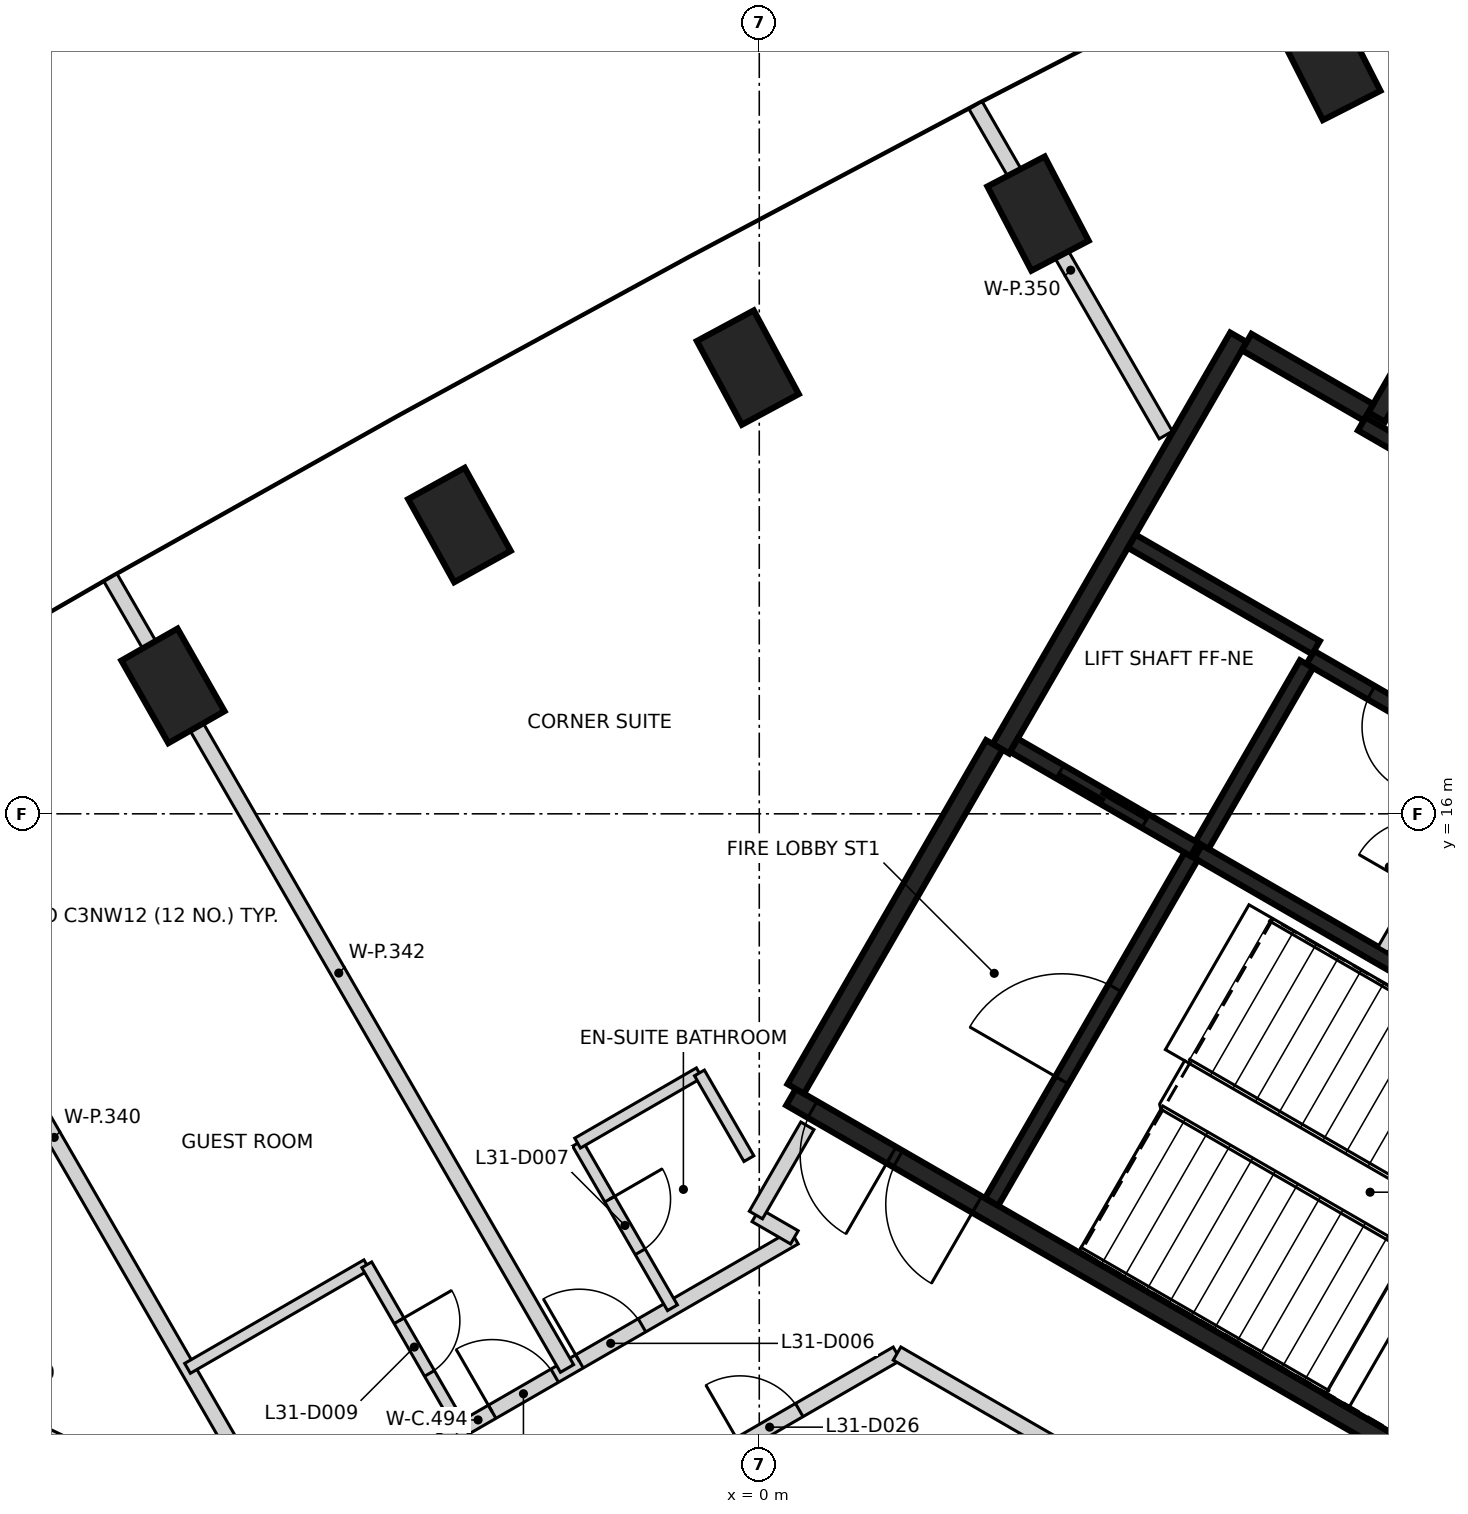
"""IFC4 building model, lengths in metres.
Left out: names, types, materials, properties, quantities, classifications, styles, units other than length and angle.
Written with IfcOpenShell. Run it as: python <this file> out.ifc"""

import sys

from ifc_helpers import new_model, si_unit, direction, frame, frame_2d, origin, origin_2d, place, context, subcontext, project, spatial, rectangle, extrude, element, fill, save


model = new_model("IFC4")
c1 = context("Model", 3, precision=1e-05, world=origin(), true_north=direction((0.0, 1.0)))
c2 = subcontext(c1, "Body", "Model", "MODEL_VIEW")
j1 = project(units=[si_unit("LENGTHUNIT", "METRE"), si_unit("PLANEANGLEUNIT", "RADIAN")], contexts=[c1])
p1 = place(None, origin())
s1 = spatial("IfcSite", under=j1, at=p1, CompositionType="ELEMENT")
p2 = place(p1, origin())
s2 = spatial("IfcBuilding", under=s1, at=p2, CompositionType="ELEMENT")
p3 = place(p2, frame((0.0, 0.0, 128.8)))
s3 = spatial("IfcBuildingStorey", under=s2, at=p3, CompositionType="ELEMENT", Elevation=128.8)
for number, where, z_axis, x_axis in (
    (1, (7.51, 25.876, -0.4), (0.0, 0.0, 1.0), (-0.453, 0.892, 0.0)),
    (2, (3.667, 23.896, -0.4), (0.0, 0.0, 1.0), (-0.463, 0.886, 0.0)),
    (3, (-0.151, 21.871, -0.4), (0.0, 0.0, 1.0), (-0.474, 0.881, 0.0)),
    (4, (-3.945, 19.8, -0.4), (0.0, 0.0, 1.0), (-0.485, 0.875, 0.0)),
    (5, (-7.714, 17.683, -0.4), (0.0, 0.0, 1.0), (-0.495, 0.869, 0.0)),
):
    element("IfcColumn", number, at=place(p3, frame(where, z_axis=z_axis, x_axis=x_axis)), inside=s3, PredefinedType="COLUMN", context=c2, shape_type="SweptSolid", body=[
        extrude(rectangle(XDim=1.25, YDim=0.85, at=origin_2d()), origin(), (0.0, 0.0, 1.0), 3.6),
    ])
p4 = place(p3, frame((10.42, 6.498, 0.0), z_axis=(0.0, 0.0, 1.0), x_axis=(-0.866021906294, 0.500006057782, 0.0)))
e6 = element("IfcWall", 6, at=p4, inside=s3, PredefinedType="SHEAR", context=c2, shape_type="SweptSolid", body=[
    extrude(rectangle(XDim=11.55, YDim=0.25, at=frame_2d((5.775, 0.0))), origin(), (0.0, 0.0, 1.0), 3.2),
])
p5 = place(p4, frame((10.025, 0.0, 0.0)))
e7 = element("IfcOpeningElement", 7, at=p5, cuts=e6, PredefinedType="OPENING", context=c2, shape_type="SweptSolid", body=[
    extrude(rectangle(XDim=1.2, YDim=2.1, at=frame_2d((0.6, 1.05))), frame((0.0, 0.135, 0.0), z_axis=(0.0, -1.0, 0.0), x_axis=(1.0, 0.0, 0.0)), (0.0, 0.0, 1.0), 0.27),
])
p6 = place(p4, frame((8.725, 0.0, 0.0)))
e8 = element("IfcOpeningElement", 8, at=p6, cuts=e6, PredefinedType="OPENING", context=c2, shape_type="SweptSolid", body=[
    extrude(rectangle(XDim=1.2, YDim=2.1, at=frame_2d((0.6, 1.05))), frame((0.0, 0.135, 0.0), z_axis=(0.0, -1.0, 0.0), x_axis=(1.0, 0.0, 0.0)), (0.0, 0.0, 1.0), 0.27),
])
p7 = place(p3, frame((3.179, 16.856, 0.0), z_axis=(0.0, 0.0, 1.0), x_axis=(0.500004234368, 0.866022959057, 0.0)))
e9 = element("IfcWall", 9, at=p7, inside=s3, PredefinedType="SHEAR", context=c2, shape_type="SweptSolid", body=[
    extrude(rectangle(XDim=6.25, YDim=0.25, at=frame_2d((3.125, 0.0))), origin(), (0.0, 0.0, 1.0), 3.2),
])
p8 = place(p3, frame((0.48, 12.381, 0.0), z_axis=(0.0, 0.0, 1.0), x_axis=(0.49999885962, 0.866026062182, 0.0)))
e10 = element("IfcWall", 10, at=p8, inside=s3, PredefinedType="SHEAR", context=c2, shape_type="SweptSolid", body=[
    extrude(rectangle(XDim=5.225, YDim=0.25, at=frame_2d((2.612, 0.0))), origin(), (0.0, 0.0, 1.0), 3.2),
])
p9 = place(p3, frame((8.123, 21.219, 0.0), z_axis=(0.0, 0.0, 1.0), x_axis=(0.499987686533, 0.866032512851, 0.0)))
e11 = element("IfcWall", 11, at=p9, inside=s3, PredefinedType="SHEAR", context=c2, shape_type="SweptSolid", body=[
    extrude(rectangle(XDim=2.975, YDim=0.25, at=frame_2d((1.487, 0.0))), origin(), (0.0, 0.0, 1.0), 3.2),
])
p10 = place(p3, frame((6.413, 22.206, 0.0), z_axis=(0.0, 0.0, 1.0), x_axis=(0.866016279763, -0.500015802937, 0.0)))
e12 = element("IfcWall", 12, at=p10, inside=s3, PredefinedType="SHEAR", context=c2, shape_type="SweptSolid", body=[
    extrude(rectangle(XDim=1.849, YDim=0.25, at=frame_2d((0.925, 0.0))), origin(), (0.0, 0.0, 1.0), 3.2),
])
p11 = place(p3, frame((13.21, 18.08, 0.0), z_axis=(0.0, 0.0, 1.0), x_axis=(-0.866030299012, 0.499991521122, 0.0)))
e13 = element("IfcWall", 13, at=p11, inside=s3, PredefinedType="SHEAR", context=c2, shape_type="SweptSolid", body=[
    extrude(rectangle(XDim=6.1, YDim=0.2, at=frame_2d((3.05, 0.0))), origin(), (0.0, 0.0, 1.0), 3.2),
])
p12 = place(p11, frame((1.0, 0.0, 0.0)))
e14 = element("IfcOpeningElement", 14, at=p12, cuts=e13, PredefinedType="OPENING", context=c2, shape_type="SweptSolid", body=[
    extrude(rectangle(XDim=1.2, YDim=2.1, at=frame_2d((0.6, 1.05))), frame((0.0, 0.11, 0.0), z_axis=(0.0, -1.0, 0.0), x_axis=(1.0, 0.0, 0.0)), (0.0, 0.0, 1.0), 0.22),
])
p13 = place(p11, frame((4.05, 0.0, 0.0)))
e15 = element("IfcOpeningElement", 15, at=p13, cuts=e13, PredefinedType="OPENING", context=c2, shape_type="SweptSolid", body=[
    extrude(rectangle(XDim=1.2, YDim=2.1, at=frame_2d((0.6, 1.05))), frame((0.0, 0.11, 0.0), z_axis=(0.0, -1.0, 0.0), x_axis=(1.0, 0.0, 0.0)), (0.0, 0.0, 1.0), 0.22),
])
p14 = place(p3, frame((5.775, 15.502, 0.0), z_axis=(0.0, 0.0, 1.0), x_axis=(0.866020080793, -0.500009219579, 0.0)))
e16 = element("IfcWall", 16, at=p14, inside=s3, PredefinedType="SHEAR", context=c2, shape_type="SweptSolid", body=[
    extrude(rectangle(XDim=5.699, YDim=0.2, at=frame_2d((2.85, 0.0))), origin(), (0.0, 0.0, 1.0), 3.2),
])
p15 = place(p3, frame((12.185, 15.207, 0.0), z_axis=(0.0, 0.0, 1.0), x_axis=(-0.866020080793, 0.500009219579, 0.0)))
e17 = element("IfcWall", 17, at=p15, inside=s3, PredefinedType="SHEAR", context=c2, shape_type="SweptSolid", body=[
    extrude(rectangle(XDim=5.699, YDim=0.2, at=frame_2d((2.85, 0.0))), origin(), (0.0, 0.0, 1.0), 3.2),
])
p16 = place(p15, frame((3.874, 0.0, 0.0)))
e18 = element("IfcOpeningElement", 18, at=p16, cuts=e17, PredefinedType="OPENING", context=c2, shape_type="SweptSolid", body=[
    extrude(rectangle(XDim=0.9, YDim=2.1, at=frame_2d((0.45, 1.05))), frame((0.0, 0.11, 0.0), z_axis=(0.0, -1.0, 0.0), x_axis=(1.0, 0.0, 0.0)), (0.0, 0.0, 1.0), 0.22),
])
p17 = place(p3, frame((3.057, 10.895, 0.0), z_axis=(0.0, 0.0, 1.0), x_axis=(0.499989418164, 0.866031513124, 0.0)))
e19 = element("IfcWall", 19, at=p17, inside=s3, PredefinedType="SHEAR", context=c2, shape_type="SweptSolid", body=[
    extrude(rectangle(XDim=5.251, YDim=0.2, at=frame_2d((2.625, 0.0))), origin(), (0.0, 0.0, 1.0), 3.2),
])
p18 = place(p17, frame((1.849, 0.0, 0.0)))
e20 = element("IfcOpeningElement", 20, at=p18, cuts=e19, PredefinedType="OPENING", context=c2, shape_type="SweptSolid", body=[
    extrude(rectangle(XDim=1.4, YDim=2.1, at=frame_2d((0.7, 1.05))), frame((0.0, 0.11, 0.0), z_axis=(0.0, -1.0, 0.0), x_axis=(1.0, 0.0, 0.0)), (0.0, 0.0, 1.0), 0.22),
])
p19 = place(p3, frame((7.199, 17.97, 0.0), z_axis=(0.0, 0.0, 1.0), x_axis=(-0.499968400327, -0.866043647095, 0.0)))
e21 = element("IfcWall", 21, at=p19, inside=s3, PredefinedType="SHEAR", context=c2, shape_type="SweptSolid", body=[
    extrude(rectangle(XDim=2.75, YDim=0.2, at=frame_2d((1.375, 0.0))), origin(), (0.0, 0.0, 1.0), 3.2),
])
p20 = place(p3, frame((5.725, 15.531, 0.0), z_axis=(0.0, 0.0, 1.0), x_axis=(-0.866037306777, 0.499979382845, 0.0)))
e22 = element("IfcWall", 22, at=p20, inside=s3, PredefinedType="SHEAR", context=c2, shape_type="SweptSolid", body=[
    extrude(rectangle(XDim=2.742, YDim=0.2, at=frame_2d((1.371, 0.0))), origin(), (0.0, 0.0, 1.0), 3.2),
])
p21 = place(p20, frame((0.743, 0.0, 0.0)))
e23 = element("IfcOpeningElement", 23, at=p21, cuts=e22, PredefinedType="OPENING", context=c2, shape_type="SweptSolid", body=[
    extrude(rectangle(XDim=1.3, YDim=2.1, at=frame_2d((0.65, 1.05))), frame((0.0, 0.11, 0.0), z_axis=(0.0, -1.0, 0.0), x_axis=(1.0, 0.0, 0.0)), (0.0, 0.0, 1.0), 0.22),
])
p22 = place(p3, frame((4.901, 19.586, 0.0), z_axis=(0.0, 0.0, 1.0), x_axis=(0.866022890907, -0.500004352405, 0.0)))
e24 = element("IfcWall", 24, at=p22, inside=s3, PredefinedType="SHEAR", context=c2, shape_type="SweptSolid", body=[
    extrude(rectangle(XDim=2.799, YDim=0.2, at=frame_2d((1.399, 0.0))), origin(), (0.0, 0.0, 1.0), 3.2),
])
p23 = place(p3, frame((8.207, 14.214, 0.0), z_axis=(0.0, 0.0, 1.0), x_axis=(0.499922376475, 0.866070215109, 0.0)))
e25 = element("IfcWall", 25, at=p23, inside=s3, PredefinedType="PARTITIONING", context=c2, shape_type="SweptSolid", body=[
    extrude(rectangle(XDim=2.749, YDim=0.15, at=frame_2d((1.374, 0.0))), origin(), (0.0, 0.0, 1.0), 3.2),
])
p24 = place(p23, frame((0.924, 0.0, 0.0)))
e26 = element("IfcOpeningElement", 26, at=p24, cuts=e25, PredefinedType="OPENING", context=c2, shape_type="SweptSolid", body=[
    extrude(rectangle(XDim=0.9, YDim=2.1, at=frame_2d((0.45, 1.05))), frame((0.0, 0.085, 0.0), z_axis=(0.0, -1.0, 0.0), x_axis=(1.0, 0.0, 0.0)), (0.0, 0.0, 1.0), 0.17),
])
p25 = place(p3, frame((-10.141, 8.176, 0.0), z_axis=(0.0, 0.0, 1.0), x_axis=(0.903904169039, -0.427735026849, 0.0)))
e27 = element("IfcWall", 27, at=p25, inside=s3, PredefinedType="PARTITIONING", context=c2, shape_type="SweptSolid", body=[
    extrude(rectangle(XDim=1.225, YDim=0.2, at=frame_2d((0.612, 0.0))), origin(), (0.0, 0.0, 1.0), 3.2),
])
p26 = place(p3, frame((-8.613, 2.881, 0.0), z_axis=(0.0, 0.0, 1.0), x_axis=(0.866103179807, 0.499865263774, 0.0)))
e28 = element("IfcWall", 28, at=p26, inside=s3, PredefinedType="PARTITIONING", context=c2, shape_type="SweptSolid", body=[
    extrude(rectangle(XDim=12.036, YDim=0.2, at=frame_2d((6.018, 0.0))), origin(), (0.0, 0.0, 1.0), 3.2),
])
p27 = place(p26, frame((9.652, 0.0, 0.0)))
e29 = element("IfcOpeningElement", 29, at=p27, cuts=e28, PredefinedType="OPENING", context=c2, shape_type="SweptSolid", body=[
    extrude(rectangle(XDim=0.9, YDim=2.1, at=frame_2d((0.45, 1.05))), frame((0.0, 0.11, 0.0), z_axis=(0.0, -1.0, 0.0), x_axis=(1.0, 0.0, 0.0)), (0.0, 0.0, 1.0), 0.22),
])
p28 = place(p26, frame((3.646, 0.0, 0.0)))
e30 = element("IfcOpeningElement", 30, at=p28, cuts=e28, PredefinedType="OPENING", context=c2, shape_type="SweptSolid", body=[
    extrude(rectangle(XDim=0.9, YDim=2.1, at=frame_2d((0.45, 1.05))), frame((0.0, 0.11, 0.0), z_axis=(0.0, -1.0, 0.0), x_axis=(1.0, 0.0, 0.0)), (0.0, 0.0, 1.0), 0.22),
])
p29 = place(p3, frame((-7.862, 5.624, 0.0), z_axis=(0.0, 0.0, 1.0), x_axis=(0.866109024618, 0.499855136491, 0.0)))
e31 = element("IfcWall", 31, at=p29, inside=s3, PredefinedType="PARTITIONING", context=c2, shape_type="SweptSolid", body=[
    extrude(rectangle(XDim=9.61, YDim=0.2, at=frame_2d((4.805, 0.0))), origin(), (0.0, 0.0, 1.0), 3.2),
])
p30 = place(p29, frame((6.345, 0.0, 0.0)))
e32 = element("IfcOpeningElement", 32, at=p30, cuts=e31, PredefinedType="OPENING", context=c2, shape_type="SweptSolid", body=[
    extrude(rectangle(XDim=0.95, YDim=2.1, at=frame_2d((0.475, 1.05))), frame((0.0, 0.11, 0.0), z_axis=(0.0, -1.0, 0.0), x_axis=(1.0, 0.0, 0.0)), (0.0, 0.0, 1.0), 0.22),
])
p31 = place(p29, frame((5.02, 0.0, 0.0)))
e33 = element("IfcOpeningElement", 33, at=p31, cuts=e31, PredefinedType="OPENING", context=c2, shape_type="SweptSolid", body=[
    extrude(rectangle(XDim=0.95, YDim=2.1, at=frame_2d((0.475, 1.05))), frame((0.0, 0.11, 0.0), z_axis=(0.0, -1.0, 0.0), x_axis=(1.0, 0.0, 0.0)), (0.0, 0.0, 1.0), 0.22),
])
p32 = place(p3, frame((-0.045, 10.721, 0.0), z_axis=(0.0, 0.0, 1.0), x_axis=(0.865768710998, -0.500444341617, 0.0)))
e34 = element("IfcWall", 34, at=p32, inside=s3, PredefinedType="PARTITIONING", context=c2, shape_type="SweptSolid", body=[
    extrude(rectangle(XDim=0.585, YDim=0.2, at=frame_2d((0.293, 0.0))), origin(), (0.0, 0.0, 1.0), 3.2),
])
p33 = place(p3, frame((-0.044, 10.722, 0.0), z_axis=(0.0, 0.0, 1.0), x_axis=(0.500034408226, 0.866005537274, 0.0)))
e35 = element("IfcWall", 35, at=p33, inside=s3, PredefinedType="PARTITIONING", context=c2, shape_type="SweptSolid", body=[
    extrude(rectangle(XDim=1.355, YDim=0.2, at=frame_2d((0.677, 0.0))), origin(), (0.0, 0.0, 1.0), 3.2),
])
p34 = place(p3, frame((1.813, 8.899, 0.0), z_axis=(0.0, 0.0, 1.0), x_axis=(0.865957732194, -0.50011719232, 0.0)))
e36 = element("IfcWall", 36, at=p34, inside=s3, PredefinedType="PARTITIONING", context=c2, shape_type="SweptSolid", body=[
    extrude(rectangle(XDim=2.891, YDim=0.2, at=frame_2d((1.445, 0.0))), origin(), (0.0, 0.0, 1.0), 2.3),
])
p35 = place(p3, frame((-12.279, 16.946, 0.0), z_axis=(0.0, 0.0, 1.0), x_axis=(0.499902454835, -0.866081714187, 0.0)))
e37 = element("IfcWall", 37, at=p35, inside=s3, PredefinedType="PARTITIONING", context=c2, shape_type="SweptSolid", body=[
    extrude(rectangle(XDim=12.015, YDim=0.2, at=frame_2d((6.008, 0.0))), origin(), (0.0, 0.0, 1.0), 3.2),
])
p36 = place(p3, frame((-8.535, 19.107, 0.0), z_axis=(0.0, 0.0, 1.0), x_axis=(0.499972843048, -0.86604108229, 0.0)))
e38 = element("IfcWall", 38, at=p36, inside=s3, PredefinedType="PARTITIONING", context=c2, shape_type="SweptSolid", body=[
    extrude(rectangle(XDim=12.013, YDim=0.2, at=frame_2d((6.007, 0.0))), origin(), (0.0, 0.0, 1.0), 3.2),
])
p37 = place(p3, frame((2.845, 25.321, 0.0), z_axis=(0.0, 0.0, 1.0), x_axis=(0.499730893997, -0.86618071647, 0.0)))
e39 = element("IfcWall", 39, at=p37, inside=s3, PredefinedType="PARTITIONING", context=c2, shape_type="SweptSolid", body=[
    extrude(rectangle(XDim=5.008, YDim=0.2, at=frame_2d((2.504, 0.0))), origin(), (0.0, 0.0, 1.0), 3.2),
])
p38 = place(p3, frame((-7.522, 8.704, 0.0), z_axis=(0.0, 0.0, 1.0), x_axis=(0.865972067821, 0.500092369221, 0.0)))
e40 = element("IfcWall", 40, at=p38, inside=s3, PredefinedType="PARTITIONING", context=c2, shape_type="SweptSolid", body=[
    extrude(rectangle(XDim=2.723, YDim=0.15, at=frame_2d((1.362, 0.0))), origin(), (0.0, 0.0, 1.0), 3.2),
])
p39 = place(p3, frame((-5.164, 10.067, 0.0), z_axis=(0.0, 0.0, 1.0), x_axis=(0.500046524342, -0.865998541277, 0.0)))
e41 = element("IfcWall", 41, at=p39, inside=s3, PredefinedType="PARTITIONING", context=c2, shape_type="SweptSolid", body=[
    extrude(rectangle(XDim=2.5, YDim=0.15, at=frame_2d((1.25, 0.0))), origin(), (0.0, 0.0, 1.0), 3.2),
])
p40 = place(p39, frame((0.85, 0.0, 0.0)))
e42 = element("IfcOpeningElement", 42, at=p40, cuts=e41, PredefinedType="OPENING", context=c2, shape_type="SweptSolid", body=[
    extrude(rectangle(XDim=0.8, YDim=2.1, at=frame_2d((0.4, 1.05))), frame((0.0, 0.085, 0.0), z_axis=(0.0, -1.0, 0.0), x_axis=(1.0, 0.0, 0.0)), (0.0, 0.0, 1.0), 0.17),
])
p41 = place(p3, frame((-2.391, 11.665, 0.0), z_axis=(0.0, 0.0, 1.0), x_axis=(0.500049599607, -0.865996765544, 0.0)))
e43 = element("IfcWall", 43, at=p41, inside=s3, PredefinedType="PARTITIONING", context=c2, shape_type="SweptSolid", body=[
    extrude(rectangle(XDim=2.498, YDim=0.15, at=frame_2d((1.249, 0.0))), origin(), (0.0, 0.0, 1.0), 3.2),
])
p42 = place(p41, frame((0.848, 0.0, 0.0)))
e44 = element("IfcOpeningElement", 44, at=p42, cuts=e43, PredefinedType="OPENING", context=c2, shape_type="SweptSolid", body=[
    extrude(rectangle(XDim=0.8, YDim=2.1, at=frame_2d((0.4, 1.05))), frame((0.0, 0.085, 0.0), z_axis=(0.0, -1.0, 0.0), x_axis=(1.0, 0.0, 0.0)), (0.0, 0.0, 1.0), 0.17),
])
p43 = place(p3, frame((-2.39, 11.668, 0.0), z_axis=(0.0, 0.0, 1.0), x_axis=(0.865932482239, 0.500160910312, 0.0)))
e45 = element("IfcWall", 45, at=p43, inside=s3, PredefinedType="PARTITIONING", context=c2, shape_type="SweptSolid", body=[
    extrude(rectangle(XDim=1.848, YDim=0.15, at=frame_2d((0.924, 0.0))), origin(), (0.0, 0.0, 1.0), 3.2),
])
p44 = place(p3, frame((-0.787, 12.591, 0.0), z_axis=(0.0, 0.0, 1.0), x_axis=(0.499749509877, -0.866169976031, 0.0)))
e46 = element("IfcWall", 46, at=p44, inside=s3, PredefinedType="PARTITIONING", context=c2, shape_type="SweptSolid", body=[
    extrude(rectangle(XDim=1.302, YDim=0.15, at=frame_2d((0.651, 0.0))), origin(), (0.0, 0.0, 1.0), 3.2),
])
p45 = place(p21, origin())
e47 = element("IfcDoor", 47, at=p45, inside=s3, OperationType="SLIDING_TO_LEFT", PredefinedType="DOOR", context=c2, shape_type="SweptSolid", body=[
    extrude(rectangle(XDim=1.3, YDim=2.1, at=frame_2d((0.65, 1.05))), frame((0.0, 0.025, 0.0), z_axis=(0.0, -1.0, 0.0), x_axis=(1.0, 0.0, 0.0)), (0.0, 0.0, 1.0), 0.05),
])
fill(e23, e47)
p46 = place(p5, origin())
e48 = element("IfcDoor", 48, at=p46, inside=s3, OperationType="SINGLE_SWING_LEFT", PredefinedType="DOOR", context=c2, shape_type="SweptSolid", body=[
    extrude(rectangle(XDim=1.2, YDim=2.1, at=frame_2d((0.6, 1.05))), frame((0.0, 0.025, 0.0), z_axis=(0.0, -1.0, 0.0), x_axis=(1.0, 0.0, 0.0)), (0.0, 0.0, 1.0), 0.05),
])
fill(e7, e48)
p47 = place(p6, origin())
e49 = element("IfcDoor", 49, at=p47, inside=s3, OperationType="SINGLE_SWING_RIGHT", PredefinedType="DOOR", context=c2, shape_type="SweptSolid", body=[
    extrude(rectangle(XDim=1.2, YDim=2.1, at=frame_2d((0.6, 1.05))), frame((0.0, 0.025, 0.0), z_axis=(0.0, -1.0, 0.0), x_axis=(1.0, 0.0, 0.0)), (0.0, 0.0, 1.0), 0.05),
])
fill(e8, e49)
p48 = place(p18, origin())
e50 = element("IfcDoor", 50, at=p48, inside=s3, OperationType="SINGLE_SWING_LEFT", PredefinedType="DOOR", context=c2, shape_type="SweptSolid", body=[
    extrude(rectangle(XDim=1.4, YDim=2.1, at=frame_2d((0.7, 1.05))), frame((0.0, 0.025, 0.0), z_axis=(0.0, -1.0, 0.0), x_axis=(1.0, 0.0, 0.0)), (0.0, 0.0, 1.0), 0.05),
])
fill(e20, e50)
p49 = place(p16, origin())
e51 = element("IfcDoor", 51, at=p49, inside=s3, OperationType="SINGLE_SWING_RIGHT", PredefinedType="DOOR", context=c2, shape_type="SweptSolid", body=[
    extrude(rectangle(XDim=0.9, YDim=2.1, at=frame_2d((0.45, 1.05))), frame((0.0, 0.025, 0.0), z_axis=(0.0, -1.0, 0.0), x_axis=(1.0, 0.0, 0.0)), (0.0, 0.0, 1.0), 0.05),
])
fill(e18, e51)
p50 = place(p30, origin())
e52 = element("IfcDoor", 52, at=p50, inside=s3, OperationType="SINGLE_SWING_LEFT", PredefinedType="DOOR", context=c2, shape_type="SweptSolid", body=[
    extrude(rectangle(XDim=0.95, YDim=2.1, at=frame_2d((0.475, 1.05))), frame((0.0, 0.025, 0.0), z_axis=(0.0, -1.0, 0.0), x_axis=(1.0, 0.0, 0.0)), (0.0, 0.0, 1.0), 0.05),
])
fill(e32, e52)
p51 = place(p42, origin())
e53 = element("IfcDoor", 53, at=p51, inside=s3, OperationType="SINGLE_SWING_LEFT", PredefinedType="DOOR", context=c2, shape_type="SweptSolid", body=[
    extrude(rectangle(XDim=0.8, YDim=2.1, at=frame_2d((0.4, 1.05))), frame((0.0, 0.025, 0.0), z_axis=(0.0, -1.0, 0.0), x_axis=(1.0, 0.0, 0.0)), (0.0, 0.0, 1.0), 0.05),
])
fill(e44, e53)
p52 = place(p31, origin())
e54 = element("IfcDoor", 54, at=p52, inside=s3, OperationType="SINGLE_SWING_LEFT", PredefinedType="DOOR", context=c2, shape_type="SweptSolid", body=[
    extrude(rectangle(XDim=0.95, YDim=2.1, at=frame_2d((0.475, 1.05))), frame((0.0, 0.025, 0.0), z_axis=(0.0, -1.0, 0.0), x_axis=(1.0, 0.0, 0.0)), (0.0, 0.0, 1.0), 0.05),
])
fill(e33, e54)
p53 = place(p40, frame((0.8, 0.0, 0.0), z_axis=(0.0, 0.0, 1.0), x_axis=(-1.0, 0.0, 0.0)))
e55 = element("IfcDoor", 55, at=p53, inside=s3, OperationType="SINGLE_SWING_LEFT", PredefinedType="DOOR", context=c2, shape_type="SweptSolid", body=[
    extrude(rectangle(XDim=0.8, YDim=2.1, at=frame_2d((0.4, 1.05))), frame((0.0, 0.025, 0.0), z_axis=(0.0, -1.0, 0.0), x_axis=(1.0, 0.0, 0.0)), (0.0, 0.0, 1.0), 0.05),
])
fill(e42, e55)
p54 = place(p27, frame((0.9, 0.0, 0.0), z_axis=(0.0, 0.0, 1.0), x_axis=(-1.0, 0.0, 0.0)))
e56 = element("IfcDoor", 56, at=p54, inside=s3, OperationType="SINGLE_SWING_LEFT", PredefinedType="DOOR", context=c2, shape_type="SweptSolid", body=[
    extrude(rectangle(XDim=0.9, YDim=2.1, at=frame_2d((0.45, 1.05))), frame((0.0, 0.025, 0.0), z_axis=(0.0, -1.0, 0.0), x_axis=(1.0, 0.0, 0.0)), (0.0, 0.0, 1.0), 0.05),
])
fill(e29, e56)
save(model, sys.argv[1])
